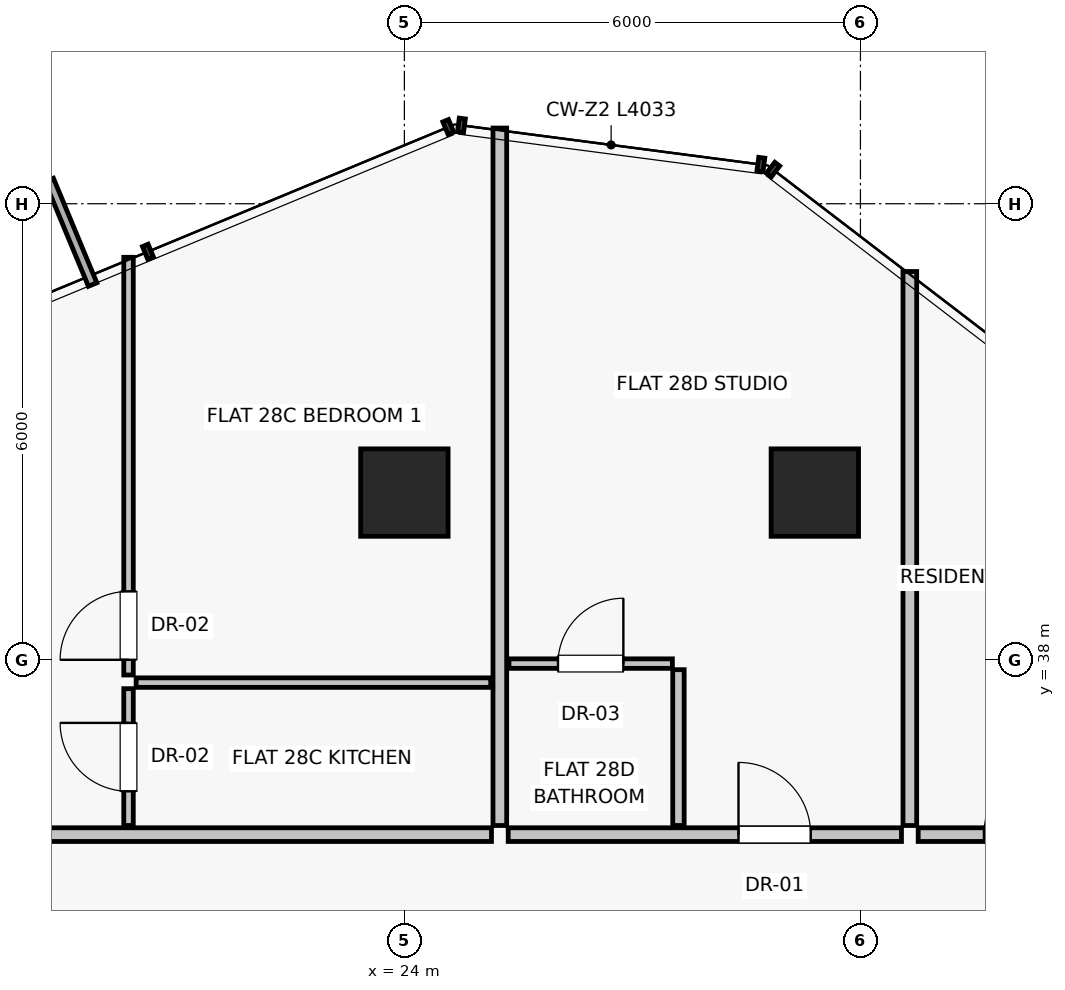
"""IFC4 building model, lengths in metres.
Left out: names, types, materials, properties, quantities, classifications, styles, units other than length and angle.
Written with IfcOpenShell. Run it as: python <this file> out.ifc"""

import sys

from ifc_helpers import new_model, si_unit, direction, frame, frame_2d, origin, origin_2d, place, context, subcontext, project, spatial, rectangle, extrude, source, transform, mapped, element, fill, save


model = new_model("IFC4")
c1 = context("Model", 3, precision=1e-05, world=origin(), true_north=direction((0.0, 1.0)))
c2 = subcontext(c1, "Body", "Model", "MODEL_VIEW")
j1 = project(units=[si_unit("LENGTHUNIT", "METRE"), si_unit("PLANEANGLEUNIT", "RADIAN")], contexts=[c1])
p1 = place(None, origin())
s1 = spatial("IfcSite", under=j1, at=p1, CompositionType="ELEMENT")
p2 = place(p1, origin())
s2 = spatial("IfcBuilding", under=s1, at=p2, CompositionType="ELEMENT")
p3 = place(p2, frame((0.0, 0.0, 102.45)))
s3 = spatial("IfcBuildingStorey", under=s2, at=p3, CompositionType="ELEMENT", Elevation=102.45)
for number, where, z_axis, x_axis in (
    (1, (29.4, 40.2, 0.0), (0.0, 0.0, 1.0), (1.0, 0.0, 0.0)),
    (2, (24.0, 40.2, 0.0), (0.0, 0.0, 1.0), (1.0, 0.0, 0.0)),
):
    element("IfcColumn", number, at=place(p3, frame(where, z_axis=z_axis, x_axis=x_axis)), inside=s3, PredefinedType="COLUMN", context=c2, shape_type="SweptSolid", body=[
        extrude(rectangle(XDim=1.15, YDim=1.15, at=origin_2d()), origin(), (0.0, 0.0, 1.0), 3.25),
    ])
p4 = place(p3, frame((14.51, 35.7, 0.0), z_axis=(0.0, 0.0, 1.0), x_axis=(1.0, 0.0, 0.0)))
e3 = element("IfcWall", 3, at=p4, inside=s3, PredefinedType="PARTITIONING", context=c2, shape_type="SweptSolid", body=[
    extrude(rectangle(XDim=10.636, YDim=0.18, at=frame_2d((5.318, 0.0))), origin(), (0.0, 0.0, 1.0), 2.58),
])
p5 = place(p4, frame((3.525, 0.0, 0.0)))
e4 = element("IfcOpeningElement", 4, at=p5, cuts=e3, PredefinedType="OPENING", context=c2, shape_type="SweptSolid", body=[
    extrude(rectangle(XDim=0.95, YDim=2.02, at=frame_2d((0.475, 1.01))), frame((0.0, 0.1, 0.0), z_axis=(0.0, -1.0, 0.0), x_axis=(1.0, 0.0, 0.0)), (0.0, 0.0, 1.0), 0.2),
])
p6 = place(p3, frame((20.371, 35.82, 0.0), z_axis=(0.0, 0.0, 1.0), x_axis=(0.0, 1.0, 0.0)))
e5 = element("IfcWall", 5, at=p6, inside=s3, PredefinedType="PARTITIONING", context=c2, shape_type="SweptSolid", body=[
    extrude(rectangle(XDim=1.8, YDim=0.125, at=frame_2d((0.9, 0.0))), origin(), (0.0, 0.0, 1.0), 3.0),
])
p7 = place(p6, frame((0.45, 0.0, 0.0)))
e6 = element("IfcOpeningElement", 6, at=p7, cuts=e5, PredefinedType="OPENING", context=c2, shape_type="SweptSolid", body=[
    extrude(rectangle(XDim=0.9, YDim=2.01, at=frame_2d((0.45, 1.005))), frame((0.0, 0.073, 0.0), z_axis=(0.0, -1.0, 0.0), x_axis=(1.0, 0.0, 0.0)), (0.0, 0.0, 1.0), 0.145),
])
p8 = place(p3, frame((20.471, 37.7, 0.0), z_axis=(0.0, 0.0, 1.0), x_axis=(1.0, 0.0, 0.0)))
e7 = element("IfcWall", 7, at=p8, inside=s3, PredefinedType="PARTITIONING", context=c2, shape_type="SweptSolid", body=[
    extrude(rectangle(XDim=4.665, YDim=0.125, at=frame_2d((2.333, 0.0))), origin(), (0.0, 0.0, 1.0), 3.0),
])
p9 = place(p3, frame((20.371, 37.8, 0.0), z_axis=(0.0, 0.0, 1.0), x_axis=(0.0, 1.0, 0.0)))
e8 = element("IfcWall", 8, at=p9, inside=s3, PredefinedType="PARTITIONING", context=c2, shape_type="SweptSolid", body=[
    extrude(rectangle(XDim=5.495, YDim=0.125, at=frame_2d((2.748, 0.0))), origin(), (0.0, 0.0, 1.0), 3.0),
])
p10 = place(p9, frame((0.2, 0.0, 0.0)))
e9 = element("IfcOpeningElement", 9, at=p10, cuts=e8, PredefinedType="OPENING", context=c2, shape_type="SweptSolid", body=[
    extrude(rectangle(XDim=0.9, YDim=2.01, at=frame_2d((0.45, 1.005))), frame((0.0, 0.073, 0.0), z_axis=(0.0, -1.0, 0.0), x_axis=(1.0, 0.0, 0.0)), (0.0, 0.0, 1.0), 0.145),
])
p11 = place(p3, frame((25.256, 35.82, 0.0), z_axis=(0.0, 0.0, 1.0), x_axis=(0.0, 1.0, 0.0)))
e10 = element("IfcWall", 10, at=p11, inside=s3, PredefinedType="PARTITIONING", context=c2, shape_type="SweptSolid", body=[
    extrude(rectangle(XDim=9.176, YDim=0.18, at=frame_2d((4.588, 0.0))), origin(), (0.0, 0.0, 1.0), 3.0),
])
p12 = place(p3, frame((30.76, 35.7, 0.0), z_axis=(0.0, 0.0, 1.0), x_axis=(1.0, 0.0, 0.0)))
e11 = element("IfcWall", 11, at=p12, inside=s3, PredefinedType="PARTITIONING", context=c2, shape_type="SweptSolid", body=[
    extrude(rectangle(XDim=2.73, YDim=0.18, at=frame_2d((1.365, 0.0))), origin(), (0.0, 0.0, 1.0), 3.0),
])
p13 = place(p12, frame((0.865, 0.0, 0.0)))
e12 = element("IfcOpeningElement", 12, at=p13, cuts=e11, PredefinedType="OPENING", context=c2, shape_type="SweptSolid", body=[
    extrude(rectangle(XDim=1.0, YDim=2.01, at=frame_2d((0.5, 1.005))), frame((0.0, 0.1, 0.0), z_axis=(0.0, -1.0, 0.0), x_axis=(1.0, 0.0, 0.0)), (0.0, 0.0, 1.0), 0.2),
])
p14 = place(p3, frame((30.65, 35.82, 0.0), z_axis=(0.0, 0.0, 1.0), x_axis=(0.0, 1.0, 0.0)))
e13 = element("IfcWall", 13, at=p14, inside=s3, PredefinedType="PARTITIONING", context=c2, shape_type="SweptSolid", body=[
    extrude(rectangle(XDim=7.288, YDim=0.18, at=frame_2d((3.644, 0.0))), origin(), (0.0, 0.0, 1.0), 3.0),
])
p15 = place(p3, frame((25.366, 35.7, 0.0), z_axis=(0.0, 0.0, 1.0), x_axis=(1.0, 0.0, 0.0)))
e14 = element("IfcWall", 14, at=p15, inside=s3, PredefinedType="PARTITIONING", context=c2, shape_type="SweptSolid", body=[
    extrude(rectangle(XDim=5.174, YDim=0.18, at=frame_2d((2.587, 0.0))), origin(), (0.0, 0.0, 1.0), 2.58),
])
p16 = place(p15, frame((3.03, 0.0, 0.0)))
e15 = element("IfcOpeningElement", 15, at=p16, cuts=e14, PredefinedType="OPENING", context=c2, shape_type="SweptSolid", body=[
    extrude(rectangle(XDim=0.95, YDim=2.02, at=frame_2d((0.475, 1.01))), frame((0.0, 0.1, 0.0), z_axis=(0.0, -1.0, 0.0), x_axis=(1.0, 0.0, 0.0)), (0.0, 0.0, 1.0), 0.2),
])
p17 = place(p3, frame((27.606, 35.82, 0.0), z_axis=(0.0, 0.0, 1.0), x_axis=(0.0, 1.0, 0.0)))
e16 = element("IfcWall", 16, at=p17, inside=s3, PredefinedType="PARTITIONING", context=c2, shape_type="SweptSolid", body=[
    extrude(rectangle(XDim=2.05, YDim=0.15, at=frame_2d((1.025, 0.0))), origin(), (0.0, 0.0, 1.0), 3.0),
])
p18 = place(p3, frame((25.376, 37.95, 0.0), z_axis=(0.0, 0.0, 1.0), x_axis=(1.0, 0.0, 0.0)))
e17 = element("IfcWall", 17, at=p18, inside=s3, PredefinedType="PARTITIONING", context=c2, shape_type="SweptSolid", body=[
    extrude(rectangle(XDim=2.15, YDim=0.125, at=frame_2d((1.075, 0.0))), origin(), (0.0, 0.0, 1.0), 3.0),
])
p19 = place(p18, frame((0.645, 0.0, 0.0)))
e18 = element("IfcOpeningElement", 18, at=p19, cuts=e17, PredefinedType="OPENING", context=c2, shape_type="SweptSolid", body=[
    extrude(rectangle(XDim=0.86, YDim=2.01, at=frame_2d((0.43, 1.005))), frame((0.0, 0.073, 0.0), z_axis=(0.0, -1.0, 0.0), x_axis=(1.0, 0.0, 0.0)), (0.0, 0.0, 1.0), 0.145),
])
m1 = source(origin(), c2, "Body", "SweptSolid", [
    extrude(rectangle(XDim=0.9, YDim=2.01, at=frame_2d((0.45, 1.005))), frame((0.0, 0.025, 0.0), z_axis=(0.0, -1.0, 0.0), x_axis=(1.0, 0.0, 0.0)), (0.0, 0.0, 1.0), 0.05),
])
p20 = place(p7, origin())
e19 = element("IfcDoor", 19, at=p20, inside=s3, OperationType="SINGLE_SWING_RIGHT", PredefinedType="DOOR", context=c2, shape_type="MappedRepresentation", body=[
    mapped(m1, transform((0.0, 0.0, 0.0), scale=1.0)),
])
fill(e6, e19)
p21 = place(p10, origin())
e20 = element("IfcDoor", 20, at=p21, inside=s3, OperationType="SINGLE_SWING_LEFT", PredefinedType="DOOR", context=c2, shape_type="MappedRepresentation", body=[
    mapped(m1, transform((0.0, 0.0, 0.0), scale=1.0)),
])
fill(e9, e20)
m2 = source(origin(), c2, "Body", "SweptSolid", [
    extrude(rectangle(XDim=1.0, YDim=2.01, at=frame_2d((0.5, 1.005))), frame((0.0, 0.025, 0.0), z_axis=(0.0, -1.0, 0.0), x_axis=(1.0, 0.0, 0.0)), (0.0, 0.0, 1.0), 0.05),
])
p22 = place(p13, origin())
e21 = element("IfcDoor", 21, at=p22, inside=s3, OperationType="SINGLE_SWING_RIGHT", PredefinedType="DOOR", context=c2, shape_type="MappedRepresentation", body=[
    mapped(m2, transform((0.0, 0.0, 0.0), scale=1.0)),
])
fill(e12, e21)
m3 = source(origin(), c2, "Body", "SweptSolid", [
    extrude(rectangle(XDim=0.95, YDim=2.02, at=frame_2d((0.475, 1.01))), frame((0.0, 0.025, 0.0), z_axis=(0.0, -1.0, 0.0), x_axis=(1.0, 0.0, 0.0)), (0.0, 0.0, 1.0), 0.05),
])
p23 = place(p16, origin())
e22 = element("IfcDoor", 22, at=p23, inside=s3, OperationType="SINGLE_SWING_LEFT", PredefinedType="DOOR", context=c2, shape_type="MappedRepresentation", body=[
    mapped(m3, transform((0.0, 0.0, 0.0), scale=1.0)),
])
fill(e15, e22)
m4 = source(origin(), c2, "Body", "SweptSolid", [
    extrude(rectangle(XDim=0.86, YDim=2.01, at=frame_2d((0.43, 1.005))), frame((0.0, 0.025, 0.0), z_axis=(0.0, -1.0, 0.0), x_axis=(1.0, 0.0, 0.0)), (0.0, 0.0, 1.0), 0.05),
])
p24 = place(p19, origin())
e23 = element("IfcDoor", 23, at=p24, inside=s3, OperationType="SINGLE_SWING_RIGHT", PredefinedType="DOOR", context=c2, shape_type="MappedRepresentation", body=[
    mapped(m4, transform((0.0, 0.0, 0.0), scale=1.0)),
])
fill(e18, e23)
save(model, sys.argv[1])
